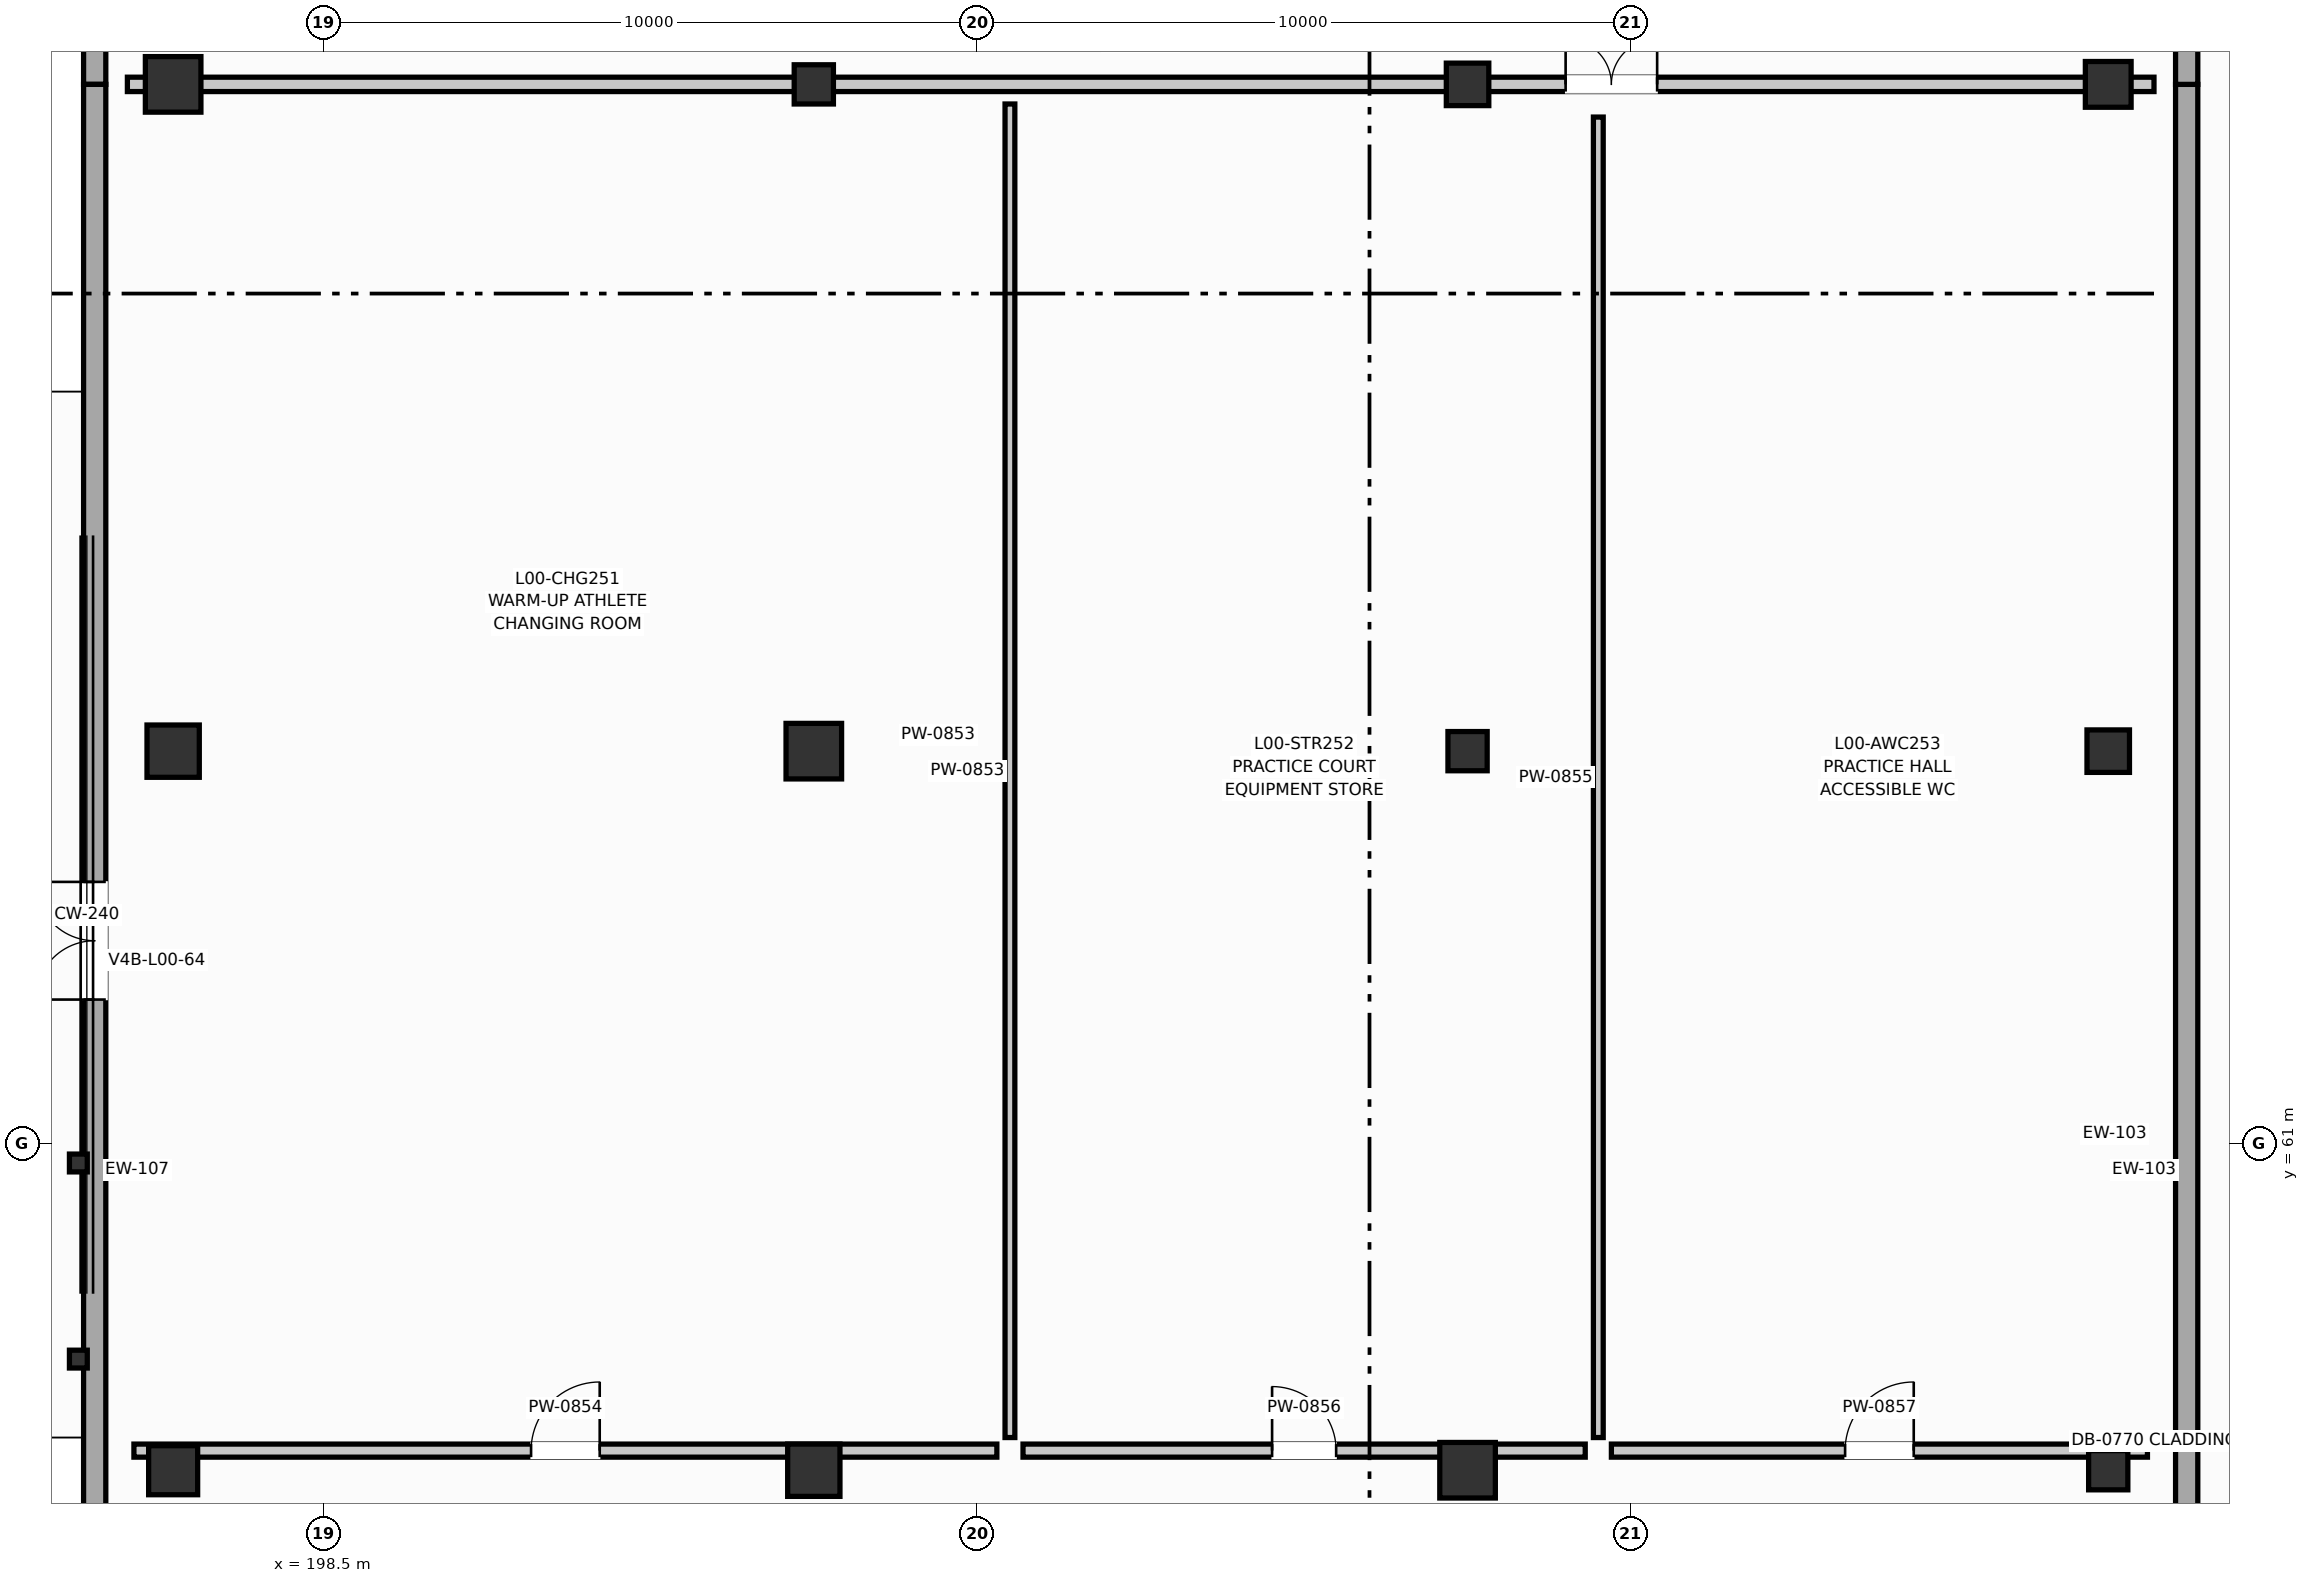
"""IFC4 building model, lengths in metres.
Left out: names, types, materials, properties, quantities, classifications, styles, units other than length and angle.
Written with IfcOpenShell. Run it as: python <this file> out.ifc"""

import sys

from ifc_helpers import new_model, si_unit, direction, frame, frame_2d, origin, origin_2d, place, context, subcontext, project, spatial, rectangle, hollow_circle, extrude, element, fill, save


model = new_model("IFC4")
c1 = context("Model", 3, precision=1e-05, world=origin(), true_north=direction((0.0, 1.0)))
c2 = subcontext(c1, "Body", "Model", "MODEL_VIEW")
j1 = project(units=[si_unit("LENGTHUNIT", "METRE"), si_unit("PLANEANGLEUNIT", "RADIAN")], contexts=[c1])
p1 = place(None, origin())
s1 = spatial("IfcSite", under=j1, at=p1, CompositionType="ELEMENT")
p2 = place(p1, origin())
s2 = spatial("IfcBuilding", under=s1, at=p2, CompositionType="ELEMENT")
p3 = place(p2, origin())
s3 = spatial("IfcBuildingStorey", under=s2, at=p3, CompositionType="ELEMENT", Elevation=0.0)
p4 = place(p3, frame((196.2, 56.0, 0.0), z_axis=(0.0, 0.0, 1.0), x_axis=(1.0, 0.0, 0.0)))
e1 = element("IfcColumn", 1, at=p4, inside=s3, PredefinedType="COLUMN", context=c2, shape_type="SweptSolid", body=[
    extrude(rectangle(XDim=0.75, YDim=0.75, at=origin_2d()), origin(), (0.0, 0.0, 1.0), 4.5),
])
p5 = place(p3, frame((196.2, 67.0, 0.0), z_axis=(0.0, 0.0, 1.0), x_axis=(1.0, 0.0, 0.0)))
e2 = element("IfcColumn", 2, at=p5, inside=s3, PredefinedType="COLUMN", context=c2, shape_type="SweptSolid", body=[
    extrude(rectangle(XDim=0.8, YDim=0.8, at=origin_2d()), origin(), (0.0, 0.0, 1.0), 4.5),
])
p6 = place(p3, frame((196.2, 77.2, 0.0), z_axis=(0.0, 0.0, 1.0), x_axis=(1.0, 0.0, 0.0)))
e3 = element("IfcColumn", 3, at=p6, inside=s3, PredefinedType="COLUMN", context=c2, shape_type="SweptSolid", body=[
    extrude(rectangle(XDim=0.85, YDim=0.85, at=origin_2d()), origin(), (0.0, 0.0, 1.0), 4.5),
])
p7 = place(p3, frame((206.0, 56.0, 0.0), z_axis=(0.0, 0.0, 1.0), x_axis=(1.0, 0.0, 0.0)))
e4 = element("IfcColumn", 4, at=p7, inside=s3, PredefinedType="COLUMN", context=c2, shape_type="SweptSolid", body=[
    extrude(rectangle(XDim=0.8, YDim=0.8, at=origin_2d()), origin(), (0.0, 0.0, 1.0), 4.5),
])
p8 = place(p3, frame((206.0, 67.0, 0.0), z_axis=(0.0, 0.0, 1.0), x_axis=(1.0, 0.0, 0.0)))
e5 = element("IfcColumn", 5, at=p8, inside=s3, PredefinedType="COLUMN", context=c2, shape_type="SweptSolid", body=[
    extrude(rectangle(XDim=0.85, YDim=0.85, at=origin_2d()), origin(), (0.0, 0.0, 1.0), 4.5),
])
p9 = place(p3, frame((206.0, 77.2, 0.0), z_axis=(0.0, 0.0, 1.0), x_axis=(1.0, 0.0, 0.0)))
e6 = element("IfcColumn", 6, at=p9, inside=s3, PredefinedType="COLUMN", context=c2, shape_type="SweptSolid", body=[
    extrude(rectangle(XDim=0.6, YDim=0.6, at=origin_2d()), origin(), (0.0, 0.0, 1.0), 4.5),
])
p10 = place(p3, frame((216.0, 56.0, 0.0), z_axis=(0.0, 0.0, 1.0), x_axis=(1.0, 0.0, 0.0)))
e7 = element("IfcColumn", 7, at=p10, inside=s3, PredefinedType="COLUMN", context=c2, shape_type="SweptSolid", body=[
    extrude(rectangle(XDim=0.85, YDim=0.85, at=origin_2d()), origin(), (0.0, 0.0, 1.0), 4.5),
])
p11 = place(p3, frame((216.0, 67.0, 0.0), z_axis=(0.0, 0.0, 1.0), x_axis=(1.0, 0.0, 0.0)))
e8 = element("IfcColumn", 8, at=p11, inside=s3, PredefinedType="COLUMN", context=c2, shape_type="SweptSolid", body=[
    extrude(rectangle(XDim=0.6, YDim=0.6, at=origin_2d()), origin(), (0.0, 0.0, 1.0), 4.5),
])
p12 = place(p3, frame((216.0, 77.2, 0.0), z_axis=(0.0, 0.0, 1.0), x_axis=(1.0, 0.0, 0.0)))
e9 = element("IfcColumn", 9, at=p12, inside=s3, PredefinedType="COLUMN", context=c2, shape_type="SweptSolid", body=[
    extrude(rectangle(XDim=0.65, YDim=0.65, at=origin_2d()), origin(), (0.0, 0.0, 1.0), 4.5),
])
p13 = place(p3, frame((225.8, 56.0, 0.0), z_axis=(0.0, 0.0, 1.0), x_axis=(1.0, 0.0, 0.0)))
e10 = element("IfcColumn", 10, at=p13, inside=s3, PredefinedType="COLUMN", context=c2, shape_type="SweptSolid", body=[
    extrude(rectangle(XDim=0.6, YDim=0.6, at=origin_2d()), origin(), (0.0, 0.0, 1.0), 4.5),
])
p14 = place(p3, frame((225.8, 67.0, 0.0), z_axis=(0.0, 0.0, 1.0), x_axis=(1.0, 0.0, 0.0)))
e11 = element("IfcColumn", 11, at=p14, inside=s3, PredefinedType="COLUMN", context=c2, shape_type="SweptSolid", body=[
    extrude(rectangle(XDim=0.65, YDim=0.65, at=origin_2d()), origin(), (0.0, 0.0, 1.0), 4.5),
])
p15 = place(p3, frame((225.8, 77.2, 0.0), z_axis=(0.0, 0.0, 1.0), x_axis=(1.0, 0.0, 0.0)))
e12 = element("IfcColumn", 12, at=p15, inside=s3, PredefinedType="COLUMN", context=c2, shape_type="SweptSolid", body=[
    extrude(rectangle(XDim=0.7, YDim=0.7, at=origin_2d()), origin(), (0.0, 0.0, 1.0), 4.5),
])
for number, where, z_axis, x_axis in (
    (13, (194.75, 57.7, 0.0), (0.0, 0.0, 1.0), (1.0, 0.0, 0.0)),
    (14, (194.75, 60.7, 0.0), (0.0, 0.0, 1.0), (1.0, 0.0, 0.0)),
):
    element("IfcColumn", number, at=place(p3, frame(where, z_axis=z_axis, x_axis=x_axis)), inside=s3, PredefinedType="COLUMN", context=c2, shape_type="SweptSolid", body=[
        extrude(hollow_circle(Radius=0.136, WallThickness=0.012, at=origin_2d()), origin(), (0.0, 0.0, 1.0), 4.5),
    ])
p16 = place(p3, frame((227.0, 44.0, 0.0), z_axis=(0.0, 0.0, 1.0), x_axis=(0.0, 1.0, 0.0)))
e15 = element("IfcWall", 15, at=p16, inside=s3, PredefinedType="SOLIDWALL", context=c2, shape_type="SweptSolid", body=[
    extrude(rectangle(XDim=33.2, YDim=0.34, at=frame_2d((16.6, 0.0))), origin(), (0.0, 0.0, 1.0), 3.55),
])
p17 = place(p16, frame((6.0, 0.0, 0.0)))
e16 = element("IfcOpeningElement", 16, at=p17, cuts=e15, PredefinedType="OPENING", context=c2, shape_type="SweptSolid", body=[
    extrude(rectangle(XDim=2.6, YDim=2.6, at=frame_2d((1.3, 1.3))), frame((0.0, 0.18, 0.0), z_axis=(0.0, -1.0, 0.0), x_axis=(1.0, 0.0, 0.0)), (0.0, 0.0, 1.0), 0.36),
])
p18 = place(p3, frame((227.0, 77.2, 0.0), z_axis=(0.0, 0.0, 1.0), x_axis=(0.0, 1.0, 0.0)))
e17 = element("IfcWall", 17, at=p18, inside=s3, PredefinedType="SOLIDWALL", context=c2, shape_type="SweptSolid", body=[
    extrude(rectangle(XDim=34.8, YDim=0.34, at=frame_2d((17.4, 0.0))), origin(), (0.0, 0.0, 1.0), 4.5),
])
p19 = place(p18, frame((12.0, 0.0, 0.0)))
e18 = element("IfcOpeningElement", 18, at=p19, cuts=e17, PredefinedType="OPENING", context=c2, shape_type="SweptSolid", body=[
    extrude(rectangle(XDim=2.6, YDim=2.6, at=frame_2d((1.3, 1.3))), frame((0.0, 0.18, 0.0), z_axis=(0.0, -1.0, 0.0), x_axis=(1.0, 0.0, 0.0)), (0.0, 0.0, 1.0), 0.36),
])
p20 = place(p3, frame((195.0, 112.0, 0.0), z_axis=(0.0, 0.0, 1.0), x_axis=(0.0, -1.0, 0.0)))
e19 = element("IfcWall", 19, at=p20, inside=s3, PredefinedType="SOLIDWALL", context=c2, shape_type="SweptSolid", body=[
    extrude(rectangle(XDim=34.8, YDim=0.34, at=frame_2d((17.4, 0.0))), origin(), (0.0, 0.0, 1.0), 4.5),
])
p21 = place(p20, frame((19.2, 0.0, 0.0)))
e20 = element("IfcOpeningElement", 20, at=p21, cuts=e19, PredefinedType="OPENING", context=c2, shape_type="SweptSolid", body=[
    extrude(rectangle(XDim=1.8, YDim=2.35, at=frame_2d((0.9, 1.175))), frame((0.0, 0.18, 0.0), z_axis=(0.0, -1.0, 0.0), x_axis=(1.0, 0.0, 0.0)), (0.0, 0.0, 1.0), 0.36),
])
p22 = place(p3, frame((195.0, 77.2, 0.0), z_axis=(0.0, 0.0, 1.0), x_axis=(0.0, -1.0, 0.0)))
e21 = element("IfcWall", 21, at=p22, inside=s3, PredefinedType="SOLIDWALL", context=c2, shape_type="SweptSolid", body=[
    extrude(rectangle(XDim=33.2, YDim=0.34, at=frame_2d((16.6, 0.0))), origin(), (0.0, 0.0, 1.0), 3.55),
])
p23 = place(p22, frame((12.2, 0.0, 0.0)))
e22 = element("IfcOpeningElement", 22, at=p23, cuts=e21, PredefinedType="OPENING", context=c2, shape_type="SweptSolid", body=[
    extrude(rectangle(XDim=1.8, YDim=2.35, at=frame_2d((0.9, 1.175))), frame((0.0, 0.18, 0.0), z_axis=(0.0, -1.0, 0.0), x_axis=(1.0, 0.0, 0.0)), (0.0, 0.0, 1.0), 0.36),
])
p24 = place(p3, frame((195.5, 77.2, 0.0), z_axis=(0.0, 0.0, 1.0), x_axis=(1.0, 0.0, 0.0)))
e23 = element("IfcWall", 23, at=p24, inside=s3, PredefinedType="PARTITIONING", context=c2, shape_type="SweptSolid", body=[
    extrude(rectangle(XDim=31.0, YDim=0.22, at=frame_2d((15.5, 0.0))), origin(), (0.0, 0.0, 1.0), 3.22),
])
p25 = place(p24, frame((22.0, 0.0, 0.0)))
e24 = element("IfcOpeningElement", 24, at=p25, cuts=e23, PredefinedType="OPENING", context=c2, shape_type="SweptSolid", body=[
    extrude(rectangle(XDim=1.4, YDim=2.2, at=frame_2d((0.7, 1.1))), frame((0.0, 0.12, 0.0), z_axis=(0.0, -1.0, 0.0), x_axis=(1.0, 0.0, 0.0)), (0.0, 0.0, 1.0), 0.24),
])
p26 = place(p3, frame((209.0, 56.5, 0.0), z_axis=(0.0, 0.0, 1.0), x_axis=(0.0, 1.0, 0.0)))
e25 = element("IfcWall", 25, at=p26, inside=s3, PredefinedType="PARTITIONING", context=c2, shape_type="SweptSolid", body=[
    extrude(rectangle(XDim=20.4, YDim=0.15, at=frame_2d((10.2, 0.0))), origin(), (0.0, 0.0, 1.0), 3.22),
])
p27 = place(p3, frame((195.6, 56.3, 0.0), z_axis=(0.0, 0.0, 1.0), x_axis=(1.0, 0.0, 0.0)))
e26 = element("IfcWall", 26, at=p27, inside=s3, PredefinedType="PARTITIONING", context=c2, shape_type="SweptSolid", body=[
    extrude(rectangle(XDim=13.2, YDim=0.2, at=frame_2d((6.6, 0.0))), origin(), (0.0, 0.0, 1.0), 3.22),
])
p28 = place(p27, frame((6.075, 0.0, 0.0)))
e27 = element("IfcOpeningElement", 27, at=p28, cuts=e26, PredefinedType="OPENING", context=c2, shape_type="SweptSolid", body=[
    extrude(rectangle(XDim=1.05, YDim=2.15, at=frame_2d((0.525, 1.075))), frame((0.0, 0.11, 0.0), z_axis=(0.0, -1.0, 0.0), x_axis=(1.0, 0.0, 0.0)), (0.0, 0.0, 1.0), 0.22),
])
p29 = place(p3, frame((218.0, 56.5, 0.0), z_axis=(0.0, 0.0, 1.0), x_axis=(0.0, 1.0, 0.0)))
e28 = element("IfcWall", 28, at=p29, inside=s3, PredefinedType="PARTITIONING", context=c2, shape_type="SweptSolid", body=[
    extrude(rectangle(XDim=20.2, YDim=0.15, at=frame_2d((10.1, 0.0))), origin(), (0.0, 0.0, 1.0), 3.22),
])
p30 = place(p3, frame((209.2, 56.3, 0.0), z_axis=(0.0, 0.0, 1.0), x_axis=(1.0, 0.0, 0.0)))
e29 = element("IfcWall", 29, at=p30, inside=s3, PredefinedType="PARTITIONING", context=c2, shape_type="SweptSolid", body=[
    extrude(rectangle(XDim=8.6, YDim=0.2, at=frame_2d((4.3, 0.0))), origin(), (0.0, 0.0, 1.0), 3.22),
])
p31 = place(p30, frame((3.81, 0.0, 0.0)))
e30 = element("IfcOpeningElement", 30, at=p31, cuts=e29, PredefinedType="OPENING", context=c2, shape_type="SweptSolid", body=[
    extrude(rectangle(XDim=0.98, YDim=2.15, at=frame_2d((0.49, 1.075))), frame((0.0, 0.11, 0.0), z_axis=(0.0, -1.0, 0.0), x_axis=(1.0, 0.0, 0.0)), (0.0, 0.0, 1.0), 0.22),
])
p32 = place(p3, frame((218.2, 56.3, 0.0), z_axis=(0.0, 0.0, 1.0), x_axis=(1.0, 0.0, 0.0)))
e31 = element("IfcWall", 31, at=p32, inside=s3, PredefinedType="PARTITIONING", context=c2, shape_type="SweptSolid", body=[
    extrude(rectangle(XDim=8.2, YDim=0.2, at=frame_2d((4.1, 0.0))), origin(), (0.0, 0.0, 1.0), 3.22),
])
p33 = place(p32, frame((3.575, 0.0, 0.0)))
e32 = element("IfcOpeningElement", 32, at=p33, cuts=e31, PredefinedType="OPENING", context=c2, shape_type="SweptSolid", body=[
    extrude(rectangle(XDim=1.05, YDim=2.15, at=frame_2d((0.525, 1.075))), frame((0.0, 0.11, 0.0), z_axis=(0.0, -1.0, 0.0), x_axis=(1.0, 0.0, 0.0)), (0.0, 0.0, 1.0), 0.22),
])
p34 = place(p23, frame((1.8, 0.0, 0.0), z_axis=(0.0, 0.0, 1.0), x_axis=(-1.0, 0.0, 0.0)))
e33 = element("IfcDoor", 33, at=p34, inside=s3, OperationType="DOUBLE_DOOR_SINGLE_SWING", PredefinedType="DOOR", context=c2, shape_type="SweptSolid", body=[
    extrude(rectangle(XDim=1.8, YDim=2.35, at=frame_2d((0.9, 1.175))), frame((0.0, 0.025, 0.0), z_axis=(0.0, -1.0, 0.0), x_axis=(1.0, 0.0, 0.0)), (0.0, 0.0, 1.0), 0.05),
])
fill(e22, e33)
p35 = place(p25, origin())
e34 = element("IfcDoor", 34, at=p35, inside=s3, OperationType="DOUBLE_DOOR_SINGLE_SWING", PredefinedType="DOOR", context=c2, shape_type="SweptSolid", body=[
    extrude(rectangle(XDim=1.4, YDim=2.2, at=frame_2d((0.7, 1.1))), frame((0.0, 0.025, 0.0), z_axis=(0.0, -1.0, 0.0), x_axis=(1.0, 0.0, 0.0)), (0.0, 0.0, 1.0), 0.05),
])
fill(e24, e34)
p36 = place(p28, origin())
e35 = element("IfcDoor", 35, at=p36, inside=s3, OperationType="SINGLE_SWING_RIGHT", PredefinedType="DOOR", context=c2, shape_type="SweptSolid", body=[
    extrude(rectangle(XDim=1.05, YDim=2.15, at=frame_2d((0.525, 1.075))), frame((0.0, 0.025, 0.0), z_axis=(0.0, -1.0, 0.0), x_axis=(1.0, 0.0, 0.0)), (0.0, 0.0, 1.0), 0.05),
])
fill(e27, e35)
p37 = place(p31, origin())
e36 = element("IfcDoor", 36, at=p37, inside=s3, OperationType="SINGLE_SWING_LEFT", PredefinedType="DOOR", context=c2, shape_type="SweptSolid", body=[
    extrude(rectangle(XDim=0.98, YDim=2.15, at=frame_2d((0.49, 1.075))), frame((0.0, 0.025, 0.0), z_axis=(0.0, -1.0, 0.0), x_axis=(1.0, 0.0, 0.0)), (0.0, 0.0, 1.0), 0.05),
])
fill(e30, e36)
p38 = place(p33, origin())
e37 = element("IfcDoor", 37, at=p38, inside=s3, OperationType="SINGLE_SWING_RIGHT", PredefinedType="DOOR", context=c2, shape_type="SweptSolid", body=[
    extrude(rectangle(XDim=1.05, YDim=2.15, at=frame_2d((0.525, 1.075))), frame((0.0, 0.025, 0.0), z_axis=(0.0, -1.0, 0.0), x_axis=(1.0, 0.0, 0.0)), (0.0, 0.0, 1.0), 0.05),
])
fill(e32, e37)
save(model, sys.argv[1])
